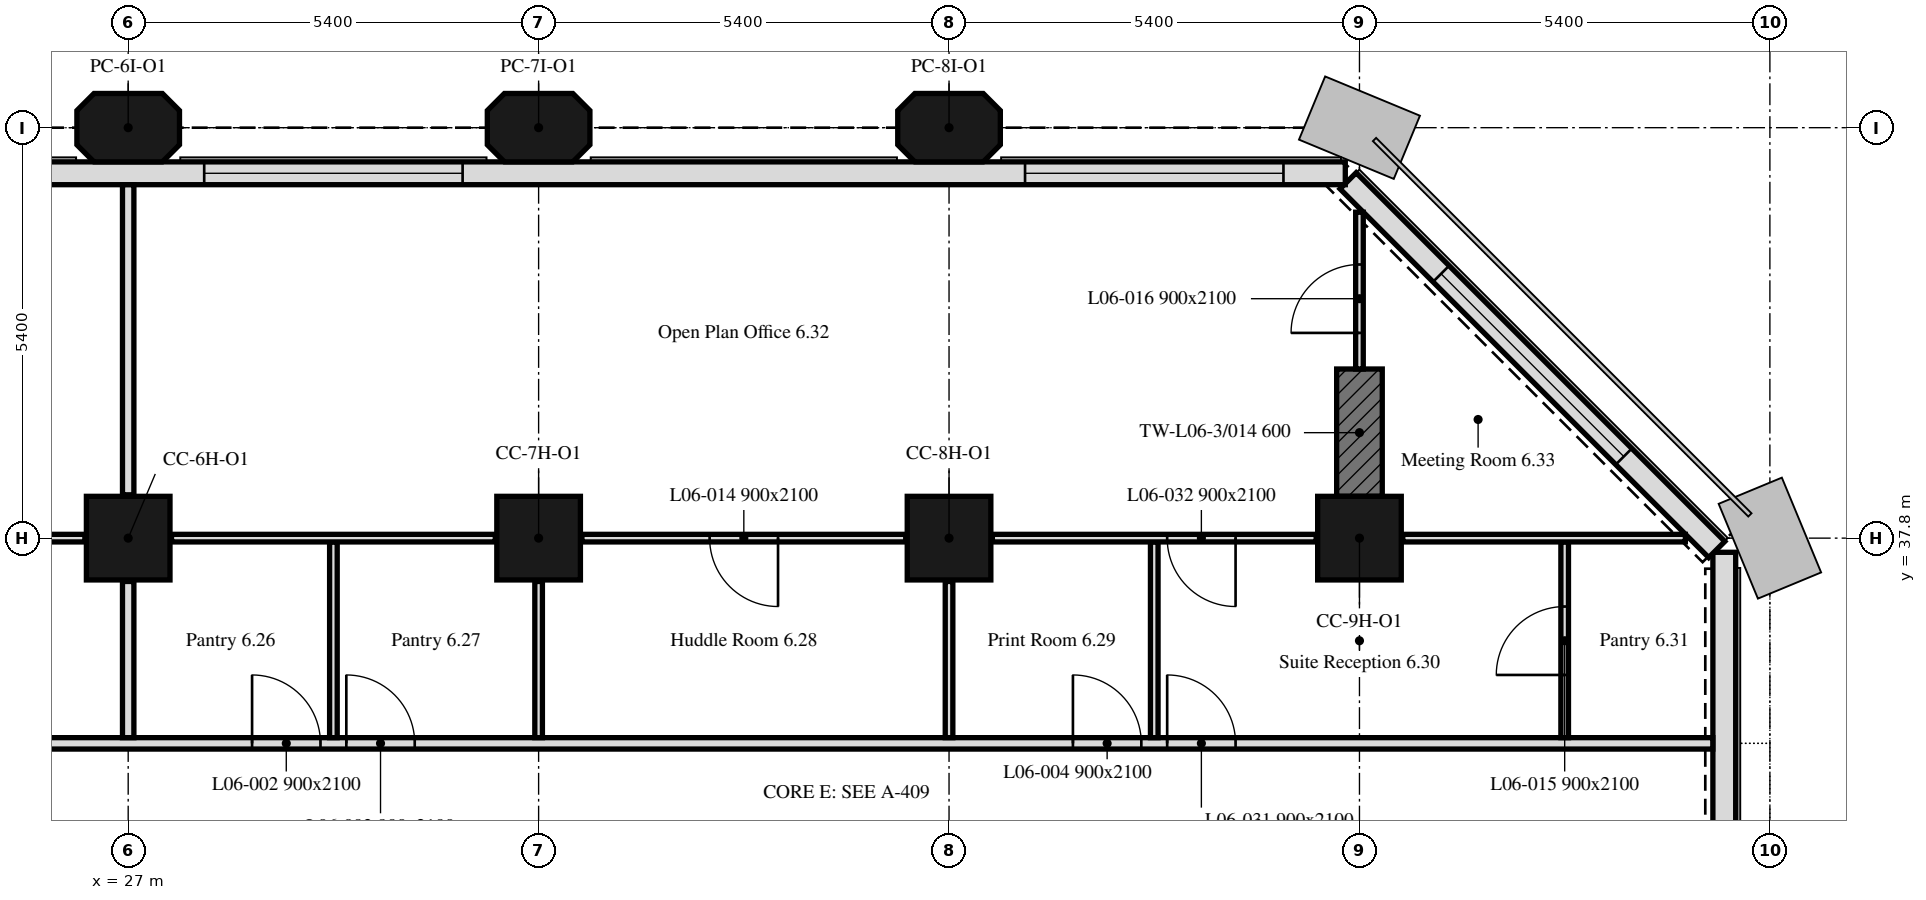
"""IFC4 building model, lengths in metres.
Left out: names, types, materials, properties, quantities, classifications, styles, units other than length and angle.
Written with IfcOpenShell. Run it as: python <this file> out.ifc"""

import sys

from ifc_helpers import new_model, si_unit, direction, frame, frame_2d, origin, origin_2d, place, context, subcontext, project, spatial, polyline, rectangle, outline, extrude, element, fill, save


model = new_model("IFC4")
c1 = context("Model", 3, precision=1e-05, world=origin(), true_north=direction((0.0, 1.0)))
c2 = subcontext(c1, "Body", "Model", "MODEL_VIEW")
j1 = project(units=[si_unit("LENGTHUNIT", "METRE"), si_unit("PLANEANGLEUNIT", "RADIAN")], contexts=[c1])
p1 = place(None, origin())
s1 = spatial("IfcSite", under=j1, at=p1, CompositionType="ELEMENT")
p2 = place(p1, origin())
s2 = spatial("IfcBuilding", under=s1, at=p2, CompositionType="ELEMENT")
p3 = place(p2, frame((0.0, 0.0, 33.6)))
s3 = spatial("IfcBuildingStorey", under=s2, at=p3, CompositionType="ELEMENT", Elevation=33.6)
for number, where, z_axis, x_axis in (
    (1, (27.0, 37.8, 0.0), (0.0, 0.0, 1.0), (1.0, 0.0, 0.0)),
    (2, (32.4, 37.8, 0.0), (0.0, 0.0, 1.0), (1.0, 0.0, 0.0)),
    (3, (37.8, 37.8, 0.0), (0.0, 0.0, 1.0), (1.0, 0.0, 0.0)),
    (4, (43.2, 37.8, 0.0), (0.0, 0.0, 1.0), (1.0, 0.0, 0.0)),
):
    element("IfcColumn", number, at=place(p3, frame(where, z_axis=z_axis, x_axis=x_axis)), inside=s3, PredefinedType="COLUMN", context=c2, shape_type="SweptSolid", body=[
        extrude(rectangle(XDim=1.1, YDim=1.1, at=origin_2d()), origin(), (0.0, 0.0, 1.0), 3.5),
    ])
for number, where, z_axis, x_axis in (
    (5, (27.0, 43.2, 0.0), (0.0, 0.0, 1.0), (1.0, 0.0, 0.0)),
    (6, (32.4, 43.2, 0.0), (0.0, 0.0, 1.0), (1.0, 0.0, 0.0)),
    (7, (37.8, 43.2, 0.0), (0.0, 0.0, 1.0), (1.0, 0.0, 0.0)),
):
    element("IfcColumn", number, at=place(p3, frame(where, z_axis=z_axis, x_axis=x_axis)), inside=s3, PredefinedType="COLUMN", context=c2, shape_type="SweptSolid", body=[
        extrude(outline(polyline([(-0.45, -0.45), (0.45, -0.45), (0.675, -0.225), (0.675, 0.225), (0.45, 0.45), (-0.45, 0.45), (-0.675, 0.225), (-0.675, -0.225), (-0.45, -0.45)])), origin(), (0.0, 0.0, 1.0), 3.5),
    ])
p4 = place(p3, frame((43.2, 38.35, 0.0), z_axis=(0.0, 0.0, 1.0), x_axis=(0.0, 1.0, 0.0)))
e8 = element("IfcWall", 8, at=p4, inside=s3, PredefinedType="SHEAR", context=c2, shape_type="SweptSolid", body=[
    extrude(rectangle(XDim=1.675, YDim=0.6, at=frame_2d((0.837, 0.0))), origin(), (0.0, 0.0, 1.0), 3.5),
])
p5 = place(p3, frame((48.0, 5.586, 0.0), z_axis=(0.0, 0.0, 1.0), x_axis=(0.0, 1.0, 0.0)))
e9 = element("IfcWall", 9, at=p5, inside=s3, PredefinedType="SOLIDWALL", context=c2, shape_type="SweptSolid", body=[
    extrude(rectangle(XDim=32.027, YDim=0.3, at=frame_2d((16.014, 0.0))), origin(), (0.0, 0.0, 1.0), 3.5),
])
p6 = place(p5, frame((0.814, 0.0, 0.9)))
e10 = element("IfcOpeningElement", 10, at=p6, cuts=e9, PredefinedType="OPENING", context=c2, shape_type="SweptSolid", body=[
    extrude(rectangle(XDim=3.4, YDim=1.7, at=frame_2d((1.7, 0.85))), frame((0.0, 0.16, 0.0), z_axis=(0.0, -1.0, 0.0), x_axis=(1.0, 0.0, 0.0)), (0.0, 0.0, 1.0), 0.32),
])
p7 = place(p3, frame((47.901, 37.65, 0.0), z_axis=(0.0, 0.0, 1.0), x_axis=(-0.707106781187, 0.707106781187, 0.0)))
e11 = element("IfcWall", 11, at=p7, inside=s3, PredefinedType="SOLIDWALL", context=c2, shape_type="SweptSolid", body=[
    extrude(rectangle(XDim=6.86, YDim=0.3, at=frame_2d((3.43, 0.0))), origin(), (0.0, 0.0, 1.0), 3.5),
])
p8 = place(p7, frame((1.73, 0.0, 0.9)))
e12 = element("IfcOpeningElement", 12, at=p8, cuts=e11, PredefinedType="OPENING", context=c2, shape_type="SweptSolid", body=[
    extrude(rectangle(XDim=3.4, YDim=1.7, at=frame_2d((1.7, 0.85))), frame((0.0, 0.16, 0.0), z_axis=(0.0, -1.0, 0.0), x_axis=(1.0, 0.0, 0.0)), (0.0, 0.0, 1.0), 0.32),
])
p9 = place(p3, frame((43.014, 42.6, 0.0), z_axis=(0.0, 0.0, 1.0), x_axis=(-1.0, 0.0, 0.0)))
e13 = element("IfcWall", 13, at=p9, inside=s3, PredefinedType="SOLIDWALL", context=c2, shape_type="SweptSolid", body=[
    extrude(rectangle(XDim=32.027, YDim=0.3, at=frame_2d((16.014, 0.0))), origin(), (0.0, 0.0, 1.0), 3.5),
])
p10 = place(p9, frame((0.814, 0.0, 0.9)))
e14 = element("IfcOpeningElement", 14, at=p10, cuts=e13, PredefinedType="OPENING", context=c2, shape_type="SweptSolid", body=[
    extrude(rectangle(XDim=3.4, YDim=1.7, at=frame_2d((1.7, 0.85))), frame((0.0, 0.16, 0.0), z_axis=(0.0, -1.0, 0.0), x_axis=(1.0, 0.0, 0.0)), (0.0, 0.0, 1.0), 0.32),
])
p11 = place(p9, frame((11.614, 0.0, 0.9)))
e15 = element("IfcOpeningElement", 15, at=p11, cuts=e13, PredefinedType="OPENING", context=c2, shape_type="SweptSolid", body=[
    extrude(rectangle(XDim=3.4, YDim=1.7, at=frame_2d((1.7, 0.85))), frame((0.0, 0.16, 0.0), z_axis=(0.0, -1.0, 0.0), x_axis=(1.0, 0.0, 0.0)), (0.0, 0.0, 1.0), 0.32),
])
p12 = place(p9, frame((22.414, 0.0, 0.9)))
e16 = element("IfcOpeningElement", 16, at=p12, cuts=e13, PredefinedType="OPENING", context=c2, shape_type="SweptSolid", body=[
    extrude(rectangle(XDim=3.4, YDim=1.7, at=frame_2d((1.7, 0.85))), frame((0.0, 0.16, 0.0), z_axis=(0.0, -1.0, 0.0), x_axis=(1.0, 0.0, 0.0)), (0.0, 0.0, 1.0), 0.32),
])
p13 = place(p3, frame((6.151, 35.1, 0.0), z_axis=(0.0, 0.0, 1.0), x_axis=(1.0, 0.0, 0.0)))
e17 = element("IfcWall", 17, at=p13, inside=s3, PredefinedType="PARTITIONING", context=c2, shape_type="SweptSolid", body=[
    extrude(rectangle(XDim=41.698, YDim=0.15, at=frame_2d((20.849, 0.0))), origin(), (0.0, 0.0, 1.0), 3.5),
])
p14 = place(p13, frame((11.679, 0.0, 0.0)))
e18 = element("IfcOpeningElement", 18, at=p14, cuts=e17, PredefinedType="OPENING", context=c2, shape_type="SweptSolid", body=[
    extrude(rectangle(XDim=0.9, YDim=2.1, at=frame_2d((0.45, 1.05))), frame((0.0, 0.075, 0.0), z_axis=(0.0, -1.0, 0.0), x_axis=(1.0, 0.0, 0.0)), (0.0, 0.0, 1.0), 0.15),
])
p15 = place(p13, frame((22.479, 0.0, 0.0)))
e19 = element("IfcOpeningElement", 19, at=p15, cuts=e17, PredefinedType="OPENING", context=c2, shape_type="SweptSolid", body=[
    extrude(rectangle(XDim=0.9, YDim=2.1, at=frame_2d((0.45, 1.05))), frame((0.0, 0.075, 0.0), z_axis=(0.0, -1.0, 0.0), x_axis=(1.0, 0.0, 0.0)), (0.0, 0.0, 1.0), 0.15),
])
p16 = place(p13, frame((23.719, 0.0, 0.0)))
e20 = element("IfcOpeningElement", 20, at=p16, cuts=e17, PredefinedType="OPENING", context=c2, shape_type="SweptSolid", body=[
    extrude(rectangle(XDim=0.9, YDim=2.1, at=frame_2d((0.45, 1.05))), frame((0.0, 0.075, 0.0), z_axis=(0.0, -1.0, 0.0), x_axis=(1.0, 0.0, 0.0)), (0.0, 0.0, 1.0), 0.15),
])
p17 = place(p13, frame((33.279, 0.0, 0.0)))
e21 = element("IfcOpeningElement", 21, at=p17, cuts=e17, PredefinedType="OPENING", context=c2, shape_type="SweptSolid", body=[
    extrude(rectangle(XDim=0.9, YDim=2.1, at=frame_2d((0.45, 1.05))), frame((0.0, 0.075, 0.0), z_axis=(0.0, -1.0, 0.0), x_axis=(1.0, 0.0, 0.0)), (0.0, 0.0, 1.0), 0.15),
])
p18 = place(p13, frame((2.174, 0.0, 0.0)))
e22 = element("IfcOpeningElement", 22, at=p18, cuts=e17, PredefinedType="OPENING", context=c2, shape_type="SweptSolid", body=[
    extrude(rectangle(XDim=0.9, YDim=2.1, at=frame_2d((0.45, 1.05))), frame((0.0, 0.075, 0.0), z_axis=(0.0, -1.0, 0.0), x_axis=(1.0, 0.0, 0.0)), (0.0, 0.0, 1.0), 0.15),
])
p19 = place(p13, frame((34.519, 0.0, 0.0)))
e23 = element("IfcOpeningElement", 23, at=p19, cuts=e17, PredefinedType="OPENING", context=c2, shape_type="SweptSolid", body=[
    extrude(rectangle(XDim=0.9, YDim=2.1, at=frame_2d((0.45, 1.05))), frame((0.0, 0.075, 0.0), z_axis=(0.0, -1.0, 0.0), x_axis=(1.0, 0.0, 0.0)), (0.0, 0.0, 1.0), 0.15),
])
p20 = place(p3, frame((27.0, 35.175, 0.0), z_axis=(0.0, 0.0, 1.0), x_axis=(0.0, 1.0, 0.0)))
e24 = element("IfcWall", 24, at=p20, inside=s3, PredefinedType="PARTITIONING", context=c2, shape_type="SweptSolid", body=[
    extrude(rectangle(XDim=2.055, YDim=0.15, at=frame_2d((1.027, 0.0))), origin(), (0.0, 0.0, 1.0), 3.5),
])
p21 = place(p3, frame((26.43, 37.8, 0.0), z_axis=(0.0, 0.0, 1.0), x_axis=(-1.0, 0.0, 0.0)))
e25 = element("IfcWall", 25, at=p21, inside=s3, PredefinedType="PARTITIONING", context=c2, shape_type="SweptSolid", body=[
    extrude(rectangle(XDim=4.26, YDim=0.1, at=frame_2d((2.13, 0.0))), origin(), (0.0, 0.0, 1.0), 3.5),
])
p22 = place(p21, frame((1.68, 0.0, 0.0)))
e26 = element("IfcOpeningElement", 26, at=p22, cuts=e25, PredefinedType="OPENING", context=c2, shape_type="SweptSolid", body=[
    extrude(rectangle(XDim=0.9, YDim=2.1, at=frame_2d((0.45, 1.05))), frame((0.0, 0.05, 0.0), z_axis=(0.0, -1.0, 0.0), x_axis=(1.0, 0.0, 0.0)), (0.0, 0.0, 1.0), 0.1),
])
p23 = place(p3, frame((27.0, 38.37, 0.0), z_axis=(0.0, 0.0, 1.0), x_axis=(0.0, 1.0, 0.0)))
e27 = element("IfcWall", 27, at=p23, inside=s3, PredefinedType="PARTITIONING", context=c2, shape_type="SweptSolid", body=[
    extrude(rectangle(XDim=4.079, YDim=0.15, at=frame_2d((2.04, 0.0))), origin(), (0.0, 0.0, 1.0), 3.5),
])
p24 = place(p3, frame((29.7, 35.175, 0.0), z_axis=(0.0, 0.0, 1.0), x_axis=(0.0, 1.0, 0.0)))
e28 = element("IfcWall", 28, at=p24, inside=s3, PredefinedType="PARTITIONING", context=c2, shape_type="SweptSolid", body=[
    extrude(rectangle(XDim=2.575, YDim=0.1, at=frame_2d((1.288, 0.0))), origin(), (0.0, 0.0, 1.0), 3.5),
])
p25 = place(p3, frame((32.4, 35.175, 0.0), z_axis=(0.0, 0.0, 1.0), x_axis=(0.0, 1.0, 0.0)))
e29 = element("IfcWall", 29, at=p25, inside=s3, PredefinedType="PARTITIONING", context=c2, shape_type="SweptSolid", body=[
    extrude(rectangle(XDim=2.055, YDim=0.1, at=frame_2d((1.027, 0.0))), origin(), (0.0, 0.0, 1.0), 3.5),
])
p26 = place(p3, frame((31.83, 37.8, 0.0), z_axis=(0.0, 0.0, 1.0), x_axis=(-1.0, 0.0, 0.0)))
e30 = element("IfcWall", 30, at=p26, inside=s3, PredefinedType="PARTITIONING", context=c2, shape_type="SweptSolid", body=[
    extrude(rectangle(XDim=4.26, YDim=0.1, at=frame_2d((2.13, 0.0))), origin(), (0.0, 0.0, 1.0), 3.5),
])
p27 = place(p3, frame((37.8, 35.175, 0.0), z_axis=(0.0, 0.0, 1.0), x_axis=(0.0, 1.0, 0.0)))
e31 = element("IfcWall", 31, at=p27, inside=s3, PredefinedType="PARTITIONING", context=c2, shape_type="SweptSolid", body=[
    extrude(rectangle(XDim=2.055, YDim=0.1, at=frame_2d((1.027, 0.0))), origin(), (0.0, 0.0, 1.0), 3.5),
])
p28 = place(p3, frame((37.23, 37.8, 0.0), z_axis=(0.0, 0.0, 1.0), x_axis=(-1.0, 0.0, 0.0)))
e32 = element("IfcWall", 32, at=p28, inside=s3, PredefinedType="PARTITIONING", context=c2, shape_type="SweptSolid", body=[
    extrude(rectangle(XDim=4.26, YDim=0.1, at=frame_2d((2.13, 0.0))), origin(), (0.0, 0.0, 1.0), 3.5),
])
p29 = place(p28, frame((1.68, 0.0, 0.0)))
e33 = element("IfcOpeningElement", 33, at=p29, cuts=e32, PredefinedType="OPENING", context=c2, shape_type="SweptSolid", body=[
    extrude(rectangle(XDim=0.9, YDim=2.1, at=frame_2d((0.45, 1.05))), frame((0.0, 0.05, 0.0), z_axis=(0.0, -1.0, 0.0), x_axis=(1.0, 0.0, 0.0)), (0.0, 0.0, 1.0), 0.1),
])
p30 = place(p3, frame((40.5, 35.175, 0.0), z_axis=(0.0, 0.0, 1.0), x_axis=(0.0, 1.0, 0.0)))
e34 = element("IfcWall", 34, at=p30, inside=s3, PredefinedType="PARTITIONING", context=c2, shape_type="SweptSolid", body=[
    extrude(rectangle(XDim=2.575, YDim=0.1, at=frame_2d((1.288, 0.0))), origin(), (0.0, 0.0, 1.0), 3.5),
])
p31 = place(p3, frame((45.9, 35.175, 0.0), z_axis=(0.0, 0.0, 1.0), x_axis=(0.0, 1.0, 0.0)))
e35 = element("IfcWall", 35, at=p31, inside=s3, PredefinedType="PARTITIONING", context=c2, shape_type="SweptSolid", body=[
    extrude(rectangle(XDim=2.575, YDim=0.1, at=frame_2d((1.288, 0.0))), origin(), (0.0, 0.0, 1.0), 3.5),
])
p32 = place(p31, frame((0.825, 0.0, 0.0)))
e36 = element("IfcOpeningElement", 36, at=p32, cuts=e35, PredefinedType="OPENING", context=c2, shape_type="SweptSolid", body=[
    extrude(rectangle(XDim=0.9, YDim=2.1, at=frame_2d((0.45, 1.05))), frame((0.0, 0.05, 0.0), z_axis=(0.0, -1.0, 0.0), x_axis=(1.0, 0.0, 0.0)), (0.0, 0.0, 1.0), 0.1),
])
p33 = place(p3, frame((42.63, 37.8, 0.0), z_axis=(0.0, 0.0, 1.0), x_axis=(-1.0, 0.0, 0.0)))
e37 = element("IfcWall", 37, at=p33, inside=s3, PredefinedType="PARTITIONING", context=c2, shape_type="SweptSolid", body=[
    extrude(rectangle(XDim=4.26, YDim=0.1, at=frame_2d((2.13, 0.0))), origin(), (0.0, 0.0, 1.0), 3.5),
])
p34 = place(p33, frame((1.06, 0.0, 0.0)))
e38 = element("IfcOpeningElement", 38, at=p34, cuts=e37, PredefinedType="OPENING", context=c2, shape_type="SweptSolid", body=[
    extrude(rectangle(XDim=0.9, YDim=2.1, at=frame_2d((0.45, 1.05))), frame((0.0, 0.05, 0.0), z_axis=(0.0, -1.0, 0.0), x_axis=(1.0, 0.0, 0.0)), (0.0, 0.0, 1.0), 0.1),
])
p35 = place(p3, frame((47.488, 37.8, 0.0), z_axis=(0.0, 0.0, 1.0), x_axis=(-1.0, 0.0, 0.0)))
e39 = element("IfcWall", 39, at=p35, inside=s3, PredefinedType="PARTITIONING", context=c2, shape_type="SweptSolid", body=[
    extrude(rectangle(XDim=3.718, YDim=0.1, at=frame_2d((1.859, 0.0))), origin(), (0.0, 0.0, 1.0), 3.5),
])
p36 = place(p3, frame((43.2, 40.025, 0.0), z_axis=(0.0, 0.0, 1.0), x_axis=(0.0, 1.0, 0.0)))
e40 = element("IfcWall", 40, at=p36, inside=s3, PredefinedType="PARTITIONING", context=c2, shape_type="SweptSolid", body=[
    extrude(rectangle(XDim=2.063, YDim=0.1, at=frame_2d((1.031, 0.0))), origin(), (0.0, 0.0, 1.0), 3.5),
])
p37 = place(p36, frame((0.475, 0.0, 0.0)))
e41 = element("IfcOpeningElement", 41, at=p37, cuts=e40, PredefinedType="OPENING", context=c2, shape_type="SweptSolid", body=[
    extrude(rectangle(XDim=0.9, YDim=2.1, at=frame_2d((0.45, 1.05))), frame((0.0, 0.05, 0.0), z_axis=(0.0, -1.0, 0.0), x_axis=(1.0, 0.0, 0.0)), (0.0, 0.0, 1.0), 0.1),
])
p38 = place(p8, origin())
e42 = element("IfcWindow", 42, at=p38, inside=s3, PartitioningType="SINGLE_PANEL", PredefinedType="WINDOW", context=c2, shape_type="SweptSolid", body=[
    extrude(rectangle(XDim=3.4, YDim=1.7, at=frame_2d((1.7, 0.85))), frame((0.0, 0.03, 0.0), z_axis=(0.0, -1.0, 0.0), x_axis=(1.0, 0.0, 0.0)), (0.0, 0.0, 1.0), 0.06),
])
fill(e12, e42)
p39 = place(p10, origin())
e43 = element("IfcWindow", 43, at=p39, inside=s3, PartitioningType="SINGLE_PANEL", PredefinedType="WINDOW", context=c2, shape_type="SweptSolid", body=[
    extrude(rectangle(XDim=3.4, YDim=1.7, at=frame_2d((1.7, 0.85))), frame((0.0, 0.03, 0.0), z_axis=(0.0, -1.0, 0.0), x_axis=(1.0, 0.0, 0.0)), (0.0, 0.0, 1.0), 0.06),
])
fill(e14, e43)
p40 = place(p11, origin())
e44 = element("IfcWindow", 44, at=p40, inside=s3, PartitioningType="SINGLE_PANEL", PredefinedType="WINDOW", context=c2, shape_type="SweptSolid", body=[
    extrude(rectangle(XDim=3.4, YDim=1.7, at=frame_2d((1.7, 0.85))), frame((0.0, 0.03, 0.0), z_axis=(0.0, -1.0, 0.0), x_axis=(1.0, 0.0, 0.0)), (0.0, 0.0, 1.0), 0.06),
])
fill(e15, e44)
p41 = place(p15, origin())
e45 = element("IfcDoor", 45, at=p41, inside=s3, OperationType="SINGLE_SWING_RIGHT", PredefinedType="DOOR", context=c2, shape_type="SweptSolid", body=[
    extrude(rectangle(XDim=0.9, YDim=2.1, at=frame_2d((0.45, 1.05))), frame((0.0, 0.025, 0.0), z_axis=(0.0, -1.0, 0.0), x_axis=(1.0, 0.0, 0.0)), (0.0, 0.0, 1.0), 0.05),
])
fill(e19, e45)
p42 = place(p16, origin())
e46 = element("IfcDoor", 46, at=p42, inside=s3, OperationType="SINGLE_SWING_RIGHT", PredefinedType="DOOR", context=c2, shape_type="SweptSolid", body=[
    extrude(rectangle(XDim=0.9, YDim=2.1, at=frame_2d((0.45, 1.05))), frame((0.0, 0.025, 0.0), z_axis=(0.0, -1.0, 0.0), x_axis=(1.0, 0.0, 0.0)), (0.0, 0.0, 1.0), 0.05),
])
fill(e20, e46)
p43 = place(p17, origin())
e47 = element("IfcDoor", 47, at=p43, inside=s3, OperationType="SINGLE_SWING_RIGHT", PredefinedType="DOOR", context=c2, shape_type="SweptSolid", body=[
    extrude(rectangle(XDim=0.9, YDim=2.1, at=frame_2d((0.45, 1.05))), frame((0.0, 0.025, 0.0), z_axis=(0.0, -1.0, 0.0), x_axis=(1.0, 0.0, 0.0)), (0.0, 0.0, 1.0), 0.05),
])
fill(e21, e47)
p44 = place(p29, origin())
e48 = element("IfcDoor", 48, at=p44, inside=s3, OperationType="SINGLE_SWING_RIGHT", PredefinedType="DOOR", context=c2, shape_type="SweptSolid", body=[
    extrude(rectangle(XDim=0.9, YDim=2.1, at=frame_2d((0.45, 1.05))), frame((0.0, 0.025, 0.0), z_axis=(0.0, -1.0, 0.0), x_axis=(1.0, 0.0, 0.0)), (0.0, 0.0, 1.0), 0.05),
])
fill(e33, e48)
p45 = place(p32, origin())
e49 = element("IfcDoor", 49, at=p45, inside=s3, OperationType="SINGLE_SWING_RIGHT", PredefinedType="DOOR", context=c2, shape_type="SweptSolid", body=[
    extrude(rectangle(XDim=0.9, YDim=2.1, at=frame_2d((0.45, 1.05))), frame((0.0, 0.025, 0.0), z_axis=(0.0, -1.0, 0.0), x_axis=(1.0, 0.0, 0.0)), (0.0, 0.0, 1.0), 0.05),
])
fill(e36, e49)
p46 = place(p37, origin())
e50 = element("IfcDoor", 50, at=p46, inside=s3, OperationType="SINGLE_SWING_LEFT", PredefinedType="DOOR", context=c2, shape_type="SweptSolid", body=[
    extrude(rectangle(XDim=0.9, YDim=2.1, at=frame_2d((0.45, 1.05))), frame((0.0, 0.025, 0.0), z_axis=(0.0, -1.0, 0.0), x_axis=(1.0, 0.0, 0.0)), (0.0, 0.0, 1.0), 0.05),
])
fill(e41, e50)
p47 = place(p19, origin())
e51 = element("IfcDoor", 51, at=p47, inside=s3, OperationType="SINGLE_SWING_LEFT", PredefinedType="DOOR", context=c2, shape_type="SweptSolid", body=[
    extrude(rectangle(XDim=0.9, YDim=2.1, at=frame_2d((0.45, 1.05))), frame((0.0, 0.025, 0.0), z_axis=(0.0, -1.0, 0.0), x_axis=(1.0, 0.0, 0.0)), (0.0, 0.0, 1.0), 0.05),
])
fill(e23, e51)
p48 = place(p34, origin())
e52 = element("IfcDoor", 52, at=p48, inside=s3, OperationType="SINGLE_SWING_RIGHT", PredefinedType="DOOR", context=c2, shape_type="SweptSolid", body=[
    extrude(rectangle(XDim=0.9, YDim=2.1, at=frame_2d((0.45, 1.05))), frame((0.0, 0.025, 0.0), z_axis=(0.0, -1.0, 0.0), x_axis=(1.0, 0.0, 0.0)), (0.0, 0.0, 1.0), 0.05),
])
fill(e38, e52)
save(model, sys.argv[1])
